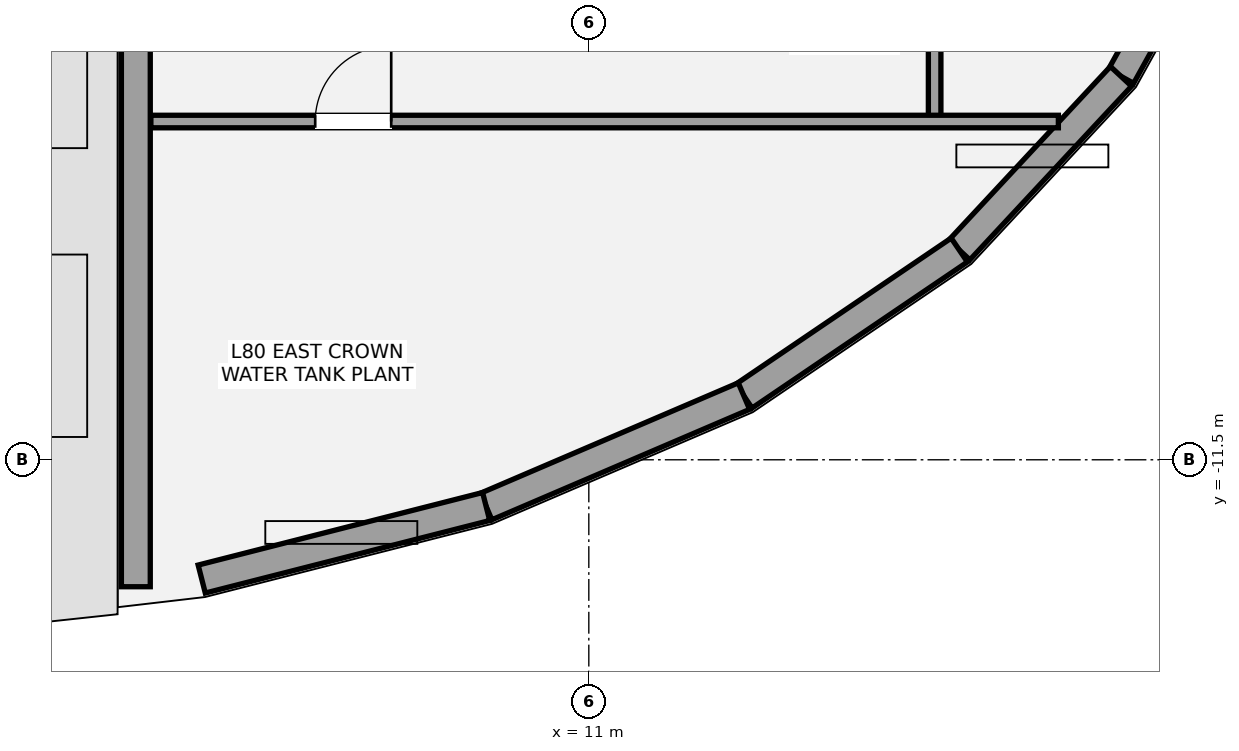
"""IFC4 building model, lengths in metres.
Left out: names, types, materials, properties, quantities, classifications, styles, units other than length and angle.
Written with IfcOpenShell. Run it as: python <this file> out.ifc"""

import sys

from ifc_helpers import new_model, si_unit, direction, frame, frame_2d, origin, place, context, subcontext, project, spatial, rectangle, extrude, element, fill, save


model = new_model("IFC4")
c1 = context("Model", 3, precision=1e-05, world=origin(), true_north=direction((0.0, 1.0)))
c2 = subcontext(c1, "Body", "Model", "MODEL_VIEW")
j1 = project(units=[si_unit("LENGTHUNIT", "METRE"), si_unit("PLANEANGLEUNIT", "RADIAN")], contexts=[c1])
p1 = place(None, origin())
s1 = spatial("IfcSite", under=j1, at=p1, CompositionType="ELEMENT")
p2 = place(p1, origin())
s2 = spatial("IfcBuilding", under=s1, at=p2, CompositionType="ELEMENT")
p3 = place(p2, frame((0.0, 0.0, 284.4)))
s3 = spatial("IfcBuildingStorey", under=s2, at=p3, CompositionType="ELEMENT", Elevation=284.4)
p4 = place(p3, frame((18.002, -6.456, 0.0), z_axis=(0.0, 0.0, 1.0), x_axis=(0.484710278861, 0.874674765594, 0.0)))
e1 = element("IfcWall", 1, at=p4, inside=s3, PredefinedType="ELEMENTEDWALL", context=c2, shape_type="SweptSolid", body=[
    extrude(rectangle(XDim=2.868, YDim=0.38, at=frame_2d((1.434, 0.0))), origin(), (0.0, 0.0, 1.0), 2.97),
])
p5 = place(p3, frame((15.875, -8.741, 0.0), z_axis=(0.0, 0.0, 1.0), x_axis=(0.681356413762, 0.731951799933, 0.0)))
e2 = element("IfcWall", 2, at=p5, inside=s3, PredefinedType="ELEMENTEDWALL", context=c2, shape_type="SweptSolid", body=[
    extrude(rectangle(XDim=3.122, YDim=0.38, at=frame_2d((1.561, 0.0))), origin(), (0.0, 0.0, 1.0), 2.97),
])
p6 = place(p3, frame((13.041, -10.662, 0.0), z_axis=(0.0, 0.0, 1.0), x_axis=(0.82760237515, 0.561314803516, 0.0)))
e3 = element("IfcWall", 3, at=p6, inside=s3, PredefinedType="ELEMENTEDWALL", context=c2, shape_type="SweptSolid", body=[
    extrude(rectangle(XDim=3.423, YDim=0.38, at=frame_2d((1.712, 0.0))), origin(), (0.0, 0.0, 1.0), 2.97),
])
p7 = place(p3, frame((9.649, -12.115, 0.0), z_axis=(0.0, 0.0, 1.0), x_axis=(0.919244249846, 0.393687705073, 0.0)))
e4 = element("IfcWall", 4, at=p7, inside=s3, PredefinedType="ELEMENTEDWALL", context=c2, shape_type="SweptSolid", body=[
    extrude(rectangle(XDim=3.69, YDim=0.38, at=frame_2d((1.845, 0.0))), origin(), (0.0, 0.0, 1.0), 2.97),
])
p8 = place(p3, frame((5.907, -13.069, 0.0), z_axis=(0.0, 0.0, 1.0), x_axis=(0.969005337837, 0.247039784739, 0.0)))
e5 = element("IfcWall", 5, at=p8, inside=s3, PredefinedType="ELEMENTEDWALL", context=c2, shape_type="SweptSolid", body=[
    extrude(rectangle(XDim=3.862, YDim=0.38, at=frame_2d((1.931, 0.0))), origin(), (0.0, 0.0, 1.0), 2.97),
])
p9 = place(p3, frame((5.04, 1.22, 0.0), z_axis=(0.0, 0.0, 1.0), x_axis=(0.0, -1.0, 0.0)))
e6 = element("IfcWall", 6, at=p9, inside=s3, PredefinedType="ELEMENTEDWALL", context=c2, shape_type="SweptSolid", body=[
    extrude(rectangle(XDim=14.39, YDim=0.38, at=frame_2d((7.195, 0.0))), origin(), (0.0, 0.0, 1.0), 2.97),
])
p10 = place(p3, frame((15.55, -7.05, 0.0), z_axis=(0.0, 0.0, 1.0), x_axis=(0.0, 1.0, 0.0)))
e7 = element("IfcWall", 7, at=p10, inside=s3, PredefinedType="PARTITIONING", context=c2, shape_type="SweptSolid", body=[
    extrude(rectangle(XDim=14.7, YDim=0.165, at=frame_2d((7.35, 0.0))), origin(), (0.0, 0.0, 1.0), 2.987),
])
p11 = place(p10, frame((5.78, 0.0, 0.0)))
e8 = element("IfcOpeningElement", 8, at=p11, cuts=e7, PredefinedType="OPENING", context=c2, shape_type="SweptSolid", body=[
    extrude(rectangle(XDim=1.0, YDim=2.15, at=frame_2d((0.5, 1.075))), frame((0.0, 0.093, 0.0), z_axis=(0.0, -1.0, 0.0), x_axis=(1.0, 0.0, 0.0)), (0.0, 0.0, 1.0), 0.185),
])
p12 = place(p3, frame((5.238, -7.05, 0.0), z_axis=(0.0, 0.0, 1.0), x_axis=(1.0, 0.0, 0.0)))
e9 = element("IfcWall", 9, at=p12, inside=s3, PredefinedType="PARTITIONING", context=c2, shape_type="SweptSolid", body=[
    extrude(rectangle(XDim=11.94, YDim=0.165, at=frame_2d((5.97, 0.0))), origin(), (0.0, 0.0, 1.0), 2.968),
])
p13 = place(p12, frame((2.162, 0.0, 0.0)))
e10 = element("IfcOpeningElement", 10, at=p13, cuts=e9, PredefinedType="OPENING", context=c2, shape_type="SweptSolid", body=[
    extrude(rectangle(XDim=1.0, YDim=2.15, at=frame_2d((0.5, 1.075))), frame((0.0, 0.093, 0.0), z_axis=(0.0, -1.0, 0.0), x_axis=(1.0, 0.0, 0.0)), (0.0, 0.0, 1.0), 0.185),
])
p14 = place(p13, origin())
e11 = element("IfcDoor", 11, at=p14, inside=s3, OperationType="SINGLE_SWING_RIGHT", PredefinedType="DOOR", context=c2, shape_type="SweptSolid", body=[
    extrude(rectangle(XDim=1.0, YDim=2.15, at=frame_2d((0.5, 1.075))), frame((0.0, 0.025, 0.0), z_axis=(0.0, -1.0, 0.0), x_axis=(1.0, 0.0, 0.0)), (0.0, 0.0, 1.0), 0.05),
])
fill(e10, e11)
save(model, sys.argv[1])
